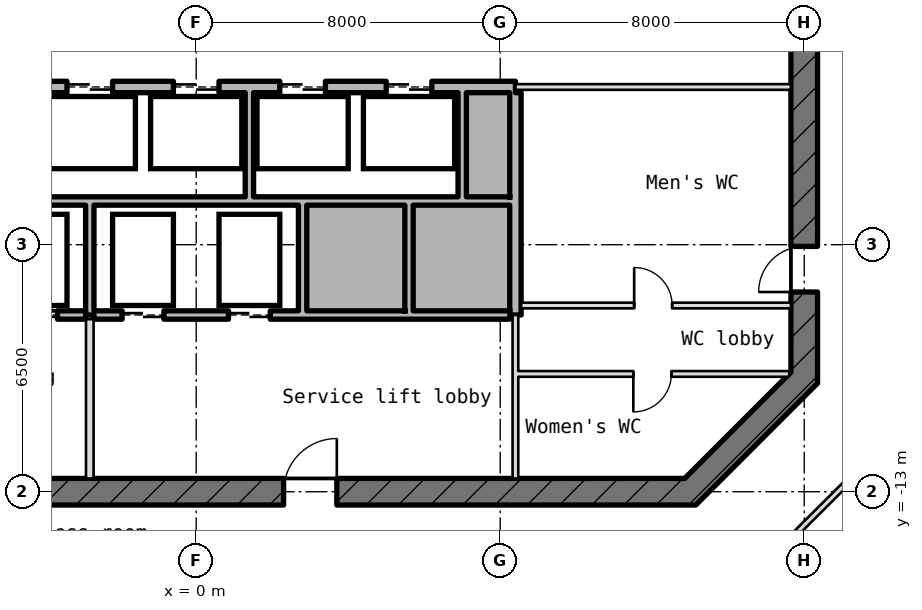
"""IFC4 building model, lengths in metres.
Left out: names, types, materials, properties, quantities, classifications, styles, units other than length and angle.
Written with IfcOpenShell. Run it as: python <this file> out.ifc"""

import sys

from ifc_helpers import new_model, si_unit, direction, frame, frame_2d, origin, place, context, subcontext, project, spatial, rectangle, extrude, element, fill, save


model = new_model("IFC4")
c1 = context("Model", 3, precision=1e-05, world=origin(), true_north=direction((0.0, 1.0)))
c2 = subcontext(c1, "Body", "Model", "MODEL_VIEW")
j1 = project(units=[si_unit("LENGTHUNIT", "METRE"), si_unit("PLANEANGLEUNIT", "RADIAN")], contexts=[c1])
p1 = place(None, origin())
s1 = spatial("IfcSite", under=j1, at=p1, CompositionType="ELEMENT")
p2 = place(p1, origin())
s2 = spatial("IfcBuilding", under=s1, at=p2, CompositionType="ELEMENT")
p3 = place(p2, frame((0.0, 0.0, 359.2)))
s3 = spatial("IfcBuildingStorey", under=s2, at=p3, CompositionType="ELEMENT", Elevation=359.2)
p4 = place(p3, frame((12.897, -13.103, -0.18), z_axis=(0.0, 0.0, 1.0), x_axis=(0.707106781187, 0.707106781187, 0.0)))
e1 = element("IfcWall", 1, at=p4, inside=s3, PredefinedType="SHEAR", context=c2, shape_type="SweptSolid", body=[
    extrude(rectangle(XDim=4.533, YDim=0.7, at=frame_2d((2.266, 0.0))), origin(), (0.0, 0.0, 1.0), 4.15),
])
p5 = place(p3, frame((16.0, -10.145, -0.18), z_axis=(0.0, 0.0, 1.0), x_axis=(0.0, 1.0, 0.0)))
e2 = element("IfcWall", 2, at=p5, inside=s3, PredefinedType="SHEAR", context=c2, shape_type="SweptSolid", body=[
    extrude(rectangle(XDim=20.29, YDim=0.7, at=frame_2d((10.145, 0.0))), origin(), (0.0, 0.0, 1.0), 4.15),
])
p6 = place(p5, frame((8.945, 0.0, 0.18)))
e3 = element("IfcOpeningElement", 3, at=p6, cuts=e2, PredefinedType="OPENING", context=c2, shape_type="SweptSolid", body=[
    extrude(rectangle(XDim=2.4, YDim=2.1, at=frame_2d((1.2, 1.05))), frame((0.0, 0.36, 0.0), z_axis=(0.0, -1.0, 0.0), x_axis=(1.0, 0.0, 0.0)), (0.0, 0.0, 1.0), 0.72),
])
p7 = place(p5, frame((13.545, 0.0, 0.18)))
e4 = element("IfcOpeningElement", 4, at=p7, cuts=e2, PredefinedType="OPENING", context=c2, shape_type="SweptSolid", body=[
    extrude(rectangle(XDim=1.2, YDim=2.1, at=frame_2d((0.6, 1.05))), frame((0.0, 0.36, 0.0), z_axis=(0.0, -1.0, 0.0), x_axis=(1.0, 0.0, 0.0)), (0.0, 0.0, 1.0), 0.72),
])
p8 = place(p5, frame((2.4, 0.0, 0.18)))
e5 = element("IfcOpeningElement", 5, at=p8, cuts=e2, PredefinedType="OPENING", context=c2, shape_type="SweptSolid", body=[
    extrude(rectangle(XDim=1.2, YDim=2.1, at=frame_2d((0.6, 1.05))), frame((0.0, 0.36, 0.0), z_axis=(0.0, -1.0, 0.0), x_axis=(1.0, 0.0, 0.0)), (0.0, 0.0, 1.0), 0.72),
])
p9 = place(p3, frame((-13.145, -13.0, -0.18), z_axis=(0.0, 0.0, 1.0), x_axis=(1.0, 0.0, 0.0)))
e6 = element("IfcWall", 6, at=p9, inside=s3, PredefinedType="SHEAR", context=c2, shape_type="SweptSolid", body=[
    extrude(rectangle(XDim=26.29, YDim=0.7, at=frame_2d((13.145, 0.0))), origin(), (0.0, 0.0, 1.0), 4.15),
])
p10 = place(p9, frame((2.845, 0.0, 0.18)))
e7 = element("IfcOpeningElement", 7, at=p10, cuts=e6, PredefinedType="OPENING", context=c2, shape_type="SweptSolid", body=[
    extrude(rectangle(XDim=1.2, YDim=2.1, at=frame_2d((0.6, 1.05))), frame((0.0, 0.36, 0.0), z_axis=(0.0, -1.0, 0.0), x_axis=(1.0, 0.0, 0.0)), (0.0, 0.0, 1.0), 0.72),
])
p11 = place(p9, frame((6.845, 0.0, 0.18)))
e8 = element("IfcOpeningElement", 8, at=p11, cuts=e6, PredefinedType="OPENING", context=c2, shape_type="SweptSolid", body=[
    extrude(rectangle(XDim=1.4, YDim=2.1, at=frame_2d((0.7, 1.05))), frame((0.0, 0.36, 0.0), z_axis=(0.0, -1.0, 0.0), x_axis=(1.0, 0.0, 0.0)), (0.0, 0.0, 1.0), 0.72),
])
p12 = place(p9, frame((15.445, 0.0, 0.18)))
e9 = element("IfcOpeningElement", 9, at=p12, cuts=e6, PredefinedType="OPENING", context=c2, shape_type="SweptSolid", body=[
    extrude(rectangle(XDim=1.4, YDim=2.1, at=frame_2d((0.7, 1.05))), frame((0.0, 0.36, 0.0), z_axis=(0.0, -1.0, 0.0), x_axis=(1.0, 0.0, 0.0)), (0.0, 0.0, 1.0), 0.72),
])
p13 = place(p3, frame((8.475, -9.9, 0.0), z_axis=(0.0, 0.0, 1.0), x_axis=(1.0, 0.0, 0.0)))
e10 = element("IfcWall", 10, at=p13, inside=s3, PredefinedType="PARTITIONING", context=c2, shape_type="SweptSolid", body=[
    extrude(rectangle(XDim=7.13, YDim=0.15, at=frame_2d((3.565, 0.0))), origin(), (0.0, 0.0, 1.0), 3.97),
])
p14 = place(p13, frame((3.028, 0.0, 0.0)))
e11 = element("IfcOpeningElement", 11, at=p14, cuts=e10, PredefinedType="OPENING", context=c2, shape_type="SweptSolid", body=[
    extrude(rectangle(XDim=1.0, YDim=2.1, at=frame_2d((0.5, 1.05))), frame((0.0, 0.085, 0.0), z_axis=(0.0, -1.0, 0.0), x_axis=(1.0, 0.0, 0.0)), (0.0, 0.0, 1.0), 0.17),
])
p15 = place(p3, frame((-8.25, -8.35, 0.0), z_axis=(0.0, 0.0, 1.0), x_axis=(1.0, 0.0, 0.0)))
e12 = element("IfcWall", 12, at=p15, inside=s3, PredefinedType="STANDARD", context=c2, shape_type="SweptSolid", body=[
    extrude(rectangle(XDim=5.34, YDim=0.22, at=frame_2d((2.67, 0.0))), origin(), (0.0, 0.0, 1.0), 3.97),
])
p16 = place(p15, frame((0.7, 0.0, 0.0)))
e13 = element("IfcOpeningElement", 13, at=p16, cuts=e12, PredefinedType="OPENING", context=c2, shape_type="SweptSolid", body=[
    extrude(rectangle(XDim=1.1, YDim=2.1, at=frame_2d((0.55, 1.05))), frame((0.0, 0.12, 0.0), z_axis=(0.0, -1.0, 0.0), x_axis=(1.0, 0.0, 0.0)), (0.0, 0.0, 1.0), 0.24),
])
p17 = place(p15, frame((3.5, 0.0, 0.0)))
e14 = element("IfcOpeningElement", 14, at=p17, cuts=e12, PredefinedType="OPENING", context=c2, shape_type="SweptSolid", body=[
    extrude(rectangle(XDim=1.1, YDim=2.1, at=frame_2d((0.55, 1.05))), frame((0.0, 0.12, 0.0), z_axis=(0.0, -1.0, 0.0), x_axis=(1.0, 0.0, 0.0)), (0.0, 0.0, 1.0), 0.24),
])
p18 = place(p3, frame((-2.69, -8.35, 0.0), z_axis=(0.0, 0.0, 1.0), x_axis=(1.0, 0.0, 0.0)))
e15 = element("IfcWall", 15, at=p18, inside=s3, PredefinedType="STANDARD", context=c2, shape_type="SweptSolid", body=[
    extrude(rectangle(XDim=10.94, YDim=0.22, at=frame_2d((5.47, 0.0))), origin(), (0.0, 0.0, 1.0), 3.97),
])
p19 = place(p18, frame((0.74, 0.0, 0.0)))
e16 = element("IfcOpeningElement", 16, at=p19, cuts=e15, PredefinedType="OPENING", context=c2, shape_type="SweptSolid", body=[
    extrude(rectangle(XDim=1.1, YDim=2.1, at=frame_2d((0.55, 1.05))), frame((0.0, 0.12, 0.0), z_axis=(0.0, -1.0, 0.0), x_axis=(1.0, 0.0, 0.0)), (0.0, 0.0, 1.0), 0.24),
])
p20 = place(p18, frame((3.54, 0.0, 0.0)))
e17 = element("IfcOpeningElement", 17, at=p20, cuts=e15, PredefinedType="OPENING", context=c2, shape_type="SweptSolid", body=[
    extrude(rectangle(XDim=1.1, YDim=2.1, at=frame_2d((0.55, 1.05))), frame((0.0, 0.12, 0.0), z_axis=(0.0, -1.0, 0.0), x_axis=(1.0, 0.0, 0.0)), (0.0, 0.0, 1.0), 0.24),
])
p21 = place(p3, frame((8.55, -8.1, 0.0), z_axis=(0.0, 0.0, 1.0), x_axis=(1.0, 0.0, 0.0)))
e18 = element("IfcWall", 18, at=p21, inside=s3, PredefinedType="PARTITIONING", context=c2, shape_type="SweptSolid", body=[
    extrude(rectangle(XDim=7.1, YDim=0.15, at=frame_2d((3.55, 0.0))), origin(), (0.0, 0.0, 1.0), 3.97),
])
p22 = place(p21, frame((2.975, 0.0, 0.0)))
e19 = element("IfcOpeningElement", 19, at=p22, cuts=e18, PredefinedType="OPENING", context=c2, shape_type="SweptSolid", body=[
    extrude(rectangle(XDim=1.0, YDim=2.1, at=frame_2d((0.5, 1.05))), frame((0.0, 0.085, 0.0), z_axis=(0.0, -1.0, 0.0), x_axis=(1.0, 0.0, 0.0)), (0.0, 0.0, 1.0), 0.17),
])
p23 = place(p3, frame((-8.25, -5.35, 0.0), z_axis=(0.0, 0.0, 1.0), x_axis=(1.0, 0.0, 0.0)))
e20 = element("IfcWall", 20, at=p23, inside=s3, PredefinedType="STANDARD", context=c2, shape_type="SweptSolid", body=[
    extrude(rectangle(XDim=16.5, YDim=0.22, at=frame_2d((8.25, 0.0))), origin(), (0.0, 0.0, 1.0), 3.97),
])
p24 = place(p3, frame((-8.4, -2.35, -0.18), z_axis=(0.0, 0.0, 1.0), x_axis=(1.0, 0.0, 0.0)))
e21 = element("IfcWall", 21, at=p24, inside=s3, PredefinedType="SHEAR", context=c2, shape_type="SweptSolid", body=[
    extrude(rectangle(XDim=16.8, YDim=0.3, at=frame_2d((8.4, 0.0))), origin(), (0.0, 0.0, 1.0), 4.15),
])
p25 = place(p24, frame((2.2, 0.0, 0.18)))
e22 = element("IfcOpeningElement", 22, at=p25, cuts=e21, PredefinedType="OPENING", context=c2, shape_type="SweptSolid", body=[
    extrude(rectangle(XDim=1.2, YDim=2.1, at=frame_2d((0.6, 1.05))), frame((0.0, 0.16, 0.0), z_axis=(0.0, -1.0, 0.0), x_axis=(1.0, 0.0, 0.0)), (0.0, 0.0, 1.0), 0.32),
])
p26 = place(p24, frame((5.0, 0.0, 0.18)))
e23 = element("IfcOpeningElement", 23, at=p26, cuts=e21, PredefinedType="OPENING", context=c2, shape_type="SweptSolid", body=[
    extrude(rectangle(XDim=1.2, YDim=2.1, at=frame_2d((0.6, 1.05))), frame((0.0, 0.16, 0.0), z_axis=(0.0, -1.0, 0.0), x_axis=(1.0, 0.0, 0.0)), (0.0, 0.0, 1.0), 0.32),
])
p27 = place(p24, frame((7.8, 0.0, 0.18)))
e24 = element("IfcOpeningElement", 24, at=p27, cuts=e21, PredefinedType="OPENING", context=c2, shape_type="SweptSolid", body=[
    extrude(rectangle(XDim=1.2, YDim=2.1, at=frame_2d((0.6, 1.05))), frame((0.0, 0.16, 0.0), z_axis=(0.0, -1.0, 0.0), x_axis=(1.0, 0.0, 0.0)), (0.0, 0.0, 1.0), 0.32),
])
p28 = place(p24, frame((10.6, 0.0, 0.18)))
e25 = element("IfcOpeningElement", 25, at=p28, cuts=e21, PredefinedType="OPENING", context=c2, shape_type="SweptSolid", body=[
    extrude(rectangle(XDim=1.2, YDim=2.1, at=frame_2d((0.6, 1.05))), frame((0.0, 0.16, 0.0), z_axis=(0.0, -1.0, 0.0), x_axis=(1.0, 0.0, 0.0)), (0.0, 0.0, 1.0), 0.32),
])
p29 = place(p24, frame((13.4, 0.0, 0.18)))
e26 = element("IfcOpeningElement", 26, at=p29, cuts=e21, PredefinedType="OPENING", context=c2, shape_type="SweptSolid", body=[
    extrude(rectangle(XDim=1.2, YDim=2.1, at=frame_2d((0.6, 1.05))), frame((0.0, 0.16, 0.0), z_axis=(0.0, -1.0, 0.0), x_axis=(1.0, 0.0, 0.0)), (0.0, 0.0, 1.0), 0.32),
])
p30 = place(p3, frame((8.4, -2.35, 0.0), z_axis=(0.0, 0.0, 1.0), x_axis=(1.0, 0.0, 0.0)))
e27 = element("IfcWall", 27, at=p30, inside=s3, PredefinedType="PARTITIONING", context=c2, shape_type="SweptSolid", body=[
    extrude(rectangle(XDim=7.25, YDim=0.15, at=frame_2d((3.625, 0.0))), origin(), (0.0, 0.0, 1.0), 3.97),
])
p31 = place(p3, frame((-2.8, -12.65, 0.0), z_axis=(0.0, 0.0, 1.0), x_axis=(0.0, 1.0, 0.0)))
e28 = element("IfcWall", 28, at=p31, inside=s3, PredefinedType="PARTITIONING", context=c2, shape_type="SweptSolid", body=[
    extrude(rectangle(XDim=4.19, YDim=0.2, at=frame_2d((2.095, 0.0))), origin(), (0.0, 0.0, 1.0), 3.97),
])
p32 = place(p3, frame((-2.8, -8.35, 0.0), z_axis=(0.0, 0.0, 1.0), x_axis=(0.0, 1.0, 0.0)))
e29 = element("IfcWall", 29, at=p32, inside=s3, PredefinedType="STANDARD", context=c2, shape_type="SweptSolid", body=[
    extrude(rectangle(XDim=2.89, YDim=0.22, at=frame_2d((1.445, 0.0))), origin(), (0.0, 0.0, 1.0), 3.97),
])
p33 = place(p3, frame((1.4, -5.24, 0.0), z_axis=(0.0, 0.0, 1.0), x_axis=(0.0, 1.0, 0.0)))
e30 = element("IfcWall", 30, at=p33, inside=s3, PredefinedType="STANDARD", context=c2, shape_type="SweptSolid", body=[
    extrude(rectangle(XDim=2.74, YDim=0.22, at=frame_2d((1.37, 0.0))), origin(), (0.0, 0.0, 1.0), 3.97),
])
for number, where, z_axis, x_axis in (
    (31, (2.8, -8.24, 0.0), (0.0, 0.0, 1.0), (0.0, 1.0, 0.0)),
    (32, (5.6, -8.24, 0.0), (0.0, 0.0, 1.0), (0.0, 1.0, 0.0)),
):
    element("IfcWall", number, at=place(p3, frame(where, z_axis=z_axis, x_axis=x_axis)), inside=s3, PredefinedType="STANDARD", context=c2, shape_type="SweptSolid", body=[
        extrude(rectangle(XDim=2.78, YDim=0.22, at=frame_2d((1.39, 0.0))), origin(), (0.0, 0.0, 1.0), 3.97),
    ])
p34 = place(p3, frame((7.0, -5.24, 0.0), z_axis=(0.0, 0.0, 1.0), x_axis=(0.0, 1.0, 0.0)))
e33 = element("IfcWall", 33, at=p34, inside=s3, PredefinedType="STANDARD", context=c2, shape_type="SweptSolid", body=[
    extrude(rectangle(XDim=2.74, YDim=0.22, at=frame_2d((1.37, 0.0))), origin(), (0.0, 0.0, 1.0), 3.97),
])
p35 = place(p3, frame((8.4, -12.65, 0.0), z_axis=(0.0, 0.0, 1.0), x_axis=(0.0, 1.0, 0.0)))
e34 = element("IfcWall", 34, at=p35, inside=s3, PredefinedType="PARTITIONING", context=c2, shape_type="SweptSolid", body=[
    extrude(rectangle(XDim=4.3, YDim=0.15, at=frame_2d((2.15, 0.0))), origin(), (0.0, 0.0, 1.0), 3.97),
])
p36 = place(p3, frame((8.4, -8.35, -0.18), z_axis=(0.0, 0.0, 1.0), x_axis=(0.0, 1.0, 0.0)))
e35 = element("IfcWall", 35, at=p36, inside=s3, PredefinedType="SHEAR", context=c2, shape_type="SweptSolid", body=[
    extrude(rectangle(XDim=5.85, YDim=0.3, at=frame_2d((2.925, 0.0))), origin(), (0.0, 0.0, 1.0), 4.15),
])
p37 = place(p3, frame((17.344, -12.541, 0.0), z_axis=(0.0, 0.0, 1.0), x_axis=(-0.708233727954, -0.705978035486, 0.0)))
e36 = element("IfcWall", 36, at=p37, inside=s3, PredefinedType="PARTITIONING", context=c2, shape_type="SweptSolid", body=[
    extrude(rectangle(XDim=4.546, YDim=0.15, at=frame_2d((2.273, 0.0))), origin(), (0.0, 0.0, 1.0), 3.508),
])
p38 = place(p26, origin())
e37 = element("IfcDoor", 37, at=p38, inside=s3, OperationType="DOUBLE_DOOR_SLIDING", PredefinedType="DOOR", context=c2, shape_type="SweptSolid", body=[
    extrude(rectangle(XDim=1.2, YDim=2.1, at=frame_2d((0.6, 1.05))), frame((0.0, 0.025, 0.0), z_axis=(0.0, -1.0, 0.0), x_axis=(1.0, 0.0, 0.0)), (0.0, 0.0, 1.0), 0.05),
])
fill(e23, e37)
p39 = place(p27, origin())
e38 = element("IfcDoor", 38, at=p39, inside=s3, OperationType="DOUBLE_DOOR_SLIDING", PredefinedType="DOOR", context=c2, shape_type="SweptSolid", body=[
    extrude(rectangle(XDim=1.2, YDim=2.1, at=frame_2d((0.6, 1.05))), frame((0.0, 0.025, 0.0), z_axis=(0.0, -1.0, 0.0), x_axis=(1.0, 0.0, 0.0)), (0.0, 0.0, 1.0), 0.05),
])
fill(e24, e38)
p40 = place(p28, origin())
e39 = element("IfcDoor", 39, at=p40, inside=s3, OperationType="DOUBLE_DOOR_SLIDING", PredefinedType="DOOR", context=c2, shape_type="SweptSolid", body=[
    extrude(rectangle(XDim=1.2, YDim=2.1, at=frame_2d((0.6, 1.05))), frame((0.0, 0.025, 0.0), z_axis=(0.0, -1.0, 0.0), x_axis=(1.0, 0.0, 0.0)), (0.0, 0.0, 1.0), 0.05),
])
fill(e25, e39)
p41 = place(p29, origin())
e40 = element("IfcDoor", 40, at=p41, inside=s3, OperationType="DOUBLE_DOOR_SLIDING", PredefinedType="DOOR", context=c2, shape_type="SweptSolid", body=[
    extrude(rectangle(XDim=1.2, YDim=2.1, at=frame_2d((0.6, 1.05))), frame((0.0, 0.025, 0.0), z_axis=(0.0, -1.0, 0.0), x_axis=(1.0, 0.0, 0.0)), (0.0, 0.0, 1.0), 0.05),
])
fill(e26, e40)
p42 = place(p17, origin())
e41 = element("IfcDoor", 41, at=p42, inside=s3, OperationType="DOUBLE_DOOR_SLIDING", PredefinedType="DOOR", context=c2, shape_type="SweptSolid", body=[
    extrude(rectangle(XDim=1.1, YDim=2.1, at=frame_2d((0.55, 1.05))), frame((0.0, 0.025, 0.0), z_axis=(0.0, -1.0, 0.0), x_axis=(1.0, 0.0, 0.0)), (0.0, 0.0, 1.0), 0.05),
])
fill(e14, e41)
p43 = place(p19, origin())
e42 = element("IfcDoor", 42, at=p43, inside=s3, OperationType="DOUBLE_DOOR_SLIDING", PredefinedType="DOOR", context=c2, shape_type="SweptSolid", body=[
    extrude(rectangle(XDim=1.1, YDim=2.1, at=frame_2d((0.55, 1.05))), frame((0.0, 0.025, 0.0), z_axis=(0.0, -1.0, 0.0), x_axis=(1.0, 0.0, 0.0)), (0.0, 0.0, 1.0), 0.05),
])
fill(e16, e42)
p44 = place(p20, origin())
e43 = element("IfcDoor", 43, at=p44, inside=s3, OperationType="DOUBLE_DOOR_SLIDING", PredefinedType="DOOR", context=c2, shape_type="SweptSolid", body=[
    extrude(rectangle(XDim=1.1, YDim=2.1, at=frame_2d((0.55, 1.05))), frame((0.0, 0.025, 0.0), z_axis=(0.0, -1.0, 0.0), x_axis=(1.0, 0.0, 0.0)), (0.0, 0.0, 1.0), 0.05),
])
fill(e17, e43)
p45 = place(p12, origin())
e44 = element("IfcDoor", 44, at=p45, inside=s3, OperationType="SINGLE_SWING_RIGHT", PredefinedType="DOOR", context=c2, shape_type="SweptSolid", body=[
    extrude(rectangle(XDim=1.4, YDim=2.1, at=frame_2d((0.7, 1.05))), frame((0.0, 0.025, 0.0), z_axis=(0.0, -1.0, 0.0), x_axis=(1.0, 0.0, 0.0)), (0.0, 0.0, 1.0), 0.05),
])
fill(e9, e44)
p46 = place(p22, origin())
e45 = element("IfcDoor", 45, at=p46, inside=s3, OperationType="SINGLE_SWING_RIGHT", PredefinedType="DOOR", context=c2, shape_type="SweptSolid", body=[
    extrude(rectangle(XDim=1.0, YDim=2.1, at=frame_2d((0.5, 1.05))), frame((0.0, 0.025, 0.0), z_axis=(0.0, -1.0, 0.0), x_axis=(1.0, 0.0, 0.0)), (0.0, 0.0, 1.0), 0.05),
])
fill(e19, e45)
p47 = place(p8, origin())
e46 = element("IfcDoor", 46, at=p47, inside=s3, OperationType="SINGLE_SWING_RIGHT", PredefinedType="DOOR", context=c2, shape_type="SweptSolid", body=[
    extrude(rectangle(XDim=1.2, YDim=2.1, at=frame_2d((0.6, 1.05))), frame((0.0, 0.025, 0.0), z_axis=(0.0, -1.0, 0.0), x_axis=(1.0, 0.0, 0.0)), (0.0, 0.0, 1.0), 0.05),
])
fill(e5, e46)
p48 = place(p14, frame((1.0, 0.0, 0.0), z_axis=(0.0, 0.0, 1.0), x_axis=(-1.0, 0.0, 0.0)))
e47 = element("IfcDoor", 47, at=p48, inside=s3, OperationType="SINGLE_SWING_LEFT", PredefinedType="DOOR", context=c2, shape_type="SweptSolid", body=[
    extrude(rectangle(XDim=1.0, YDim=2.1, at=frame_2d((0.5, 1.05))), frame((0.0, 0.025, 0.0), z_axis=(0.0, -1.0, 0.0), x_axis=(1.0, 0.0, 0.0)), (0.0, 0.0, 1.0), 0.05),
])
fill(e11, e47)
save(model, sys.argv[1])
